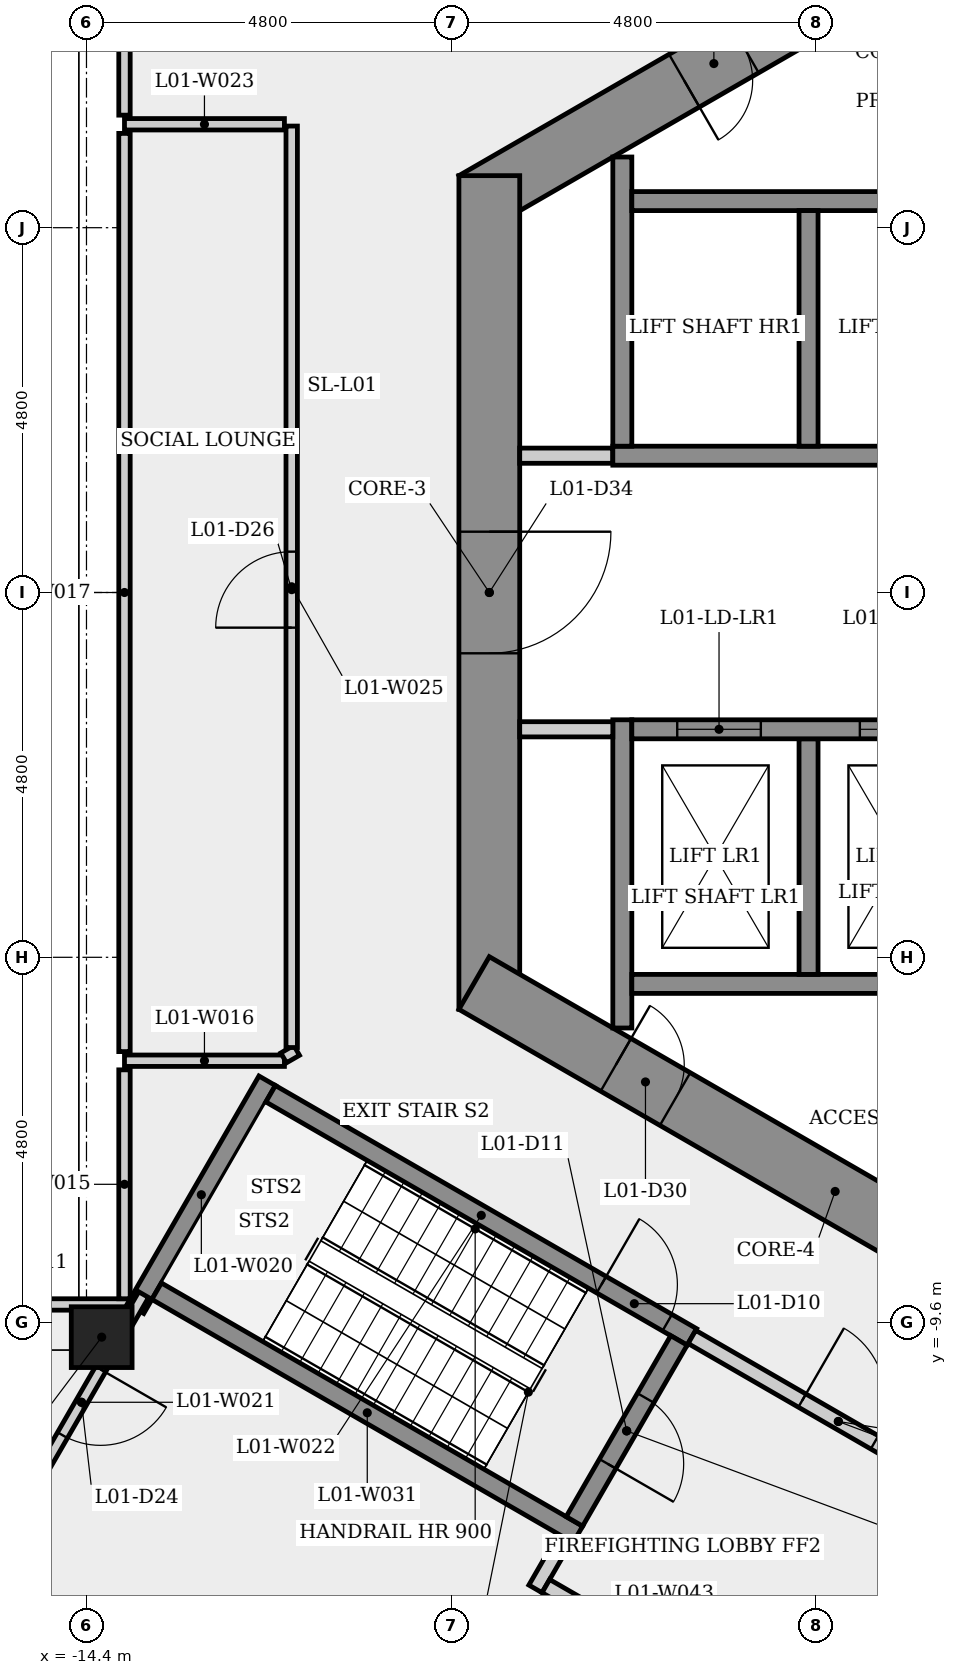
"""IFC4 building model, lengths in metres.
Left out: names, types, materials, properties, quantities, classifications, styles, units other than length and angle.
Written with IfcOpenShell. Run it as: python <this file> out.ifc"""

import sys

from ifc_helpers import new_model, si_unit, direction, frame, frame_2d, origin, origin_2d, place, context, subcontext, project, spatial, rectangle, extrude, element, fill, save


model = new_model("IFC4")
c1 = context("Model", 3, precision=1e-05, world=origin(), true_north=direction((0.0, 1.0)))
c2 = subcontext(c1, "Body", "Model", "MODEL_VIEW")
j1 = project(units=[si_unit("LENGTHUNIT", "METRE"), si_unit("PLANEANGLEUNIT", "RADIAN")], contexts=[c1])
p1 = place(None, origin())
s1 = spatial("IfcSite", under=j1, at=p1, CompositionType="ELEMENT")
p2 = place(p1, origin())
s2 = spatial("IfcBuilding", under=s1, at=p2, CompositionType="ELEMENT")
p3 = place(p2, frame((0.0, 0.0, 7.0)))
s3 = spatial("IfcBuildingStorey", under=s2, at=p3, CompositionType="ELEMENT", Elevation=7.0)
p4 = place(p3, frame((0.2, 10.623, 0.0), z_axis=(0.0, 0.0, 1.0), x_axis=(-0.866023993627, -0.500002442456, 0.0)))
e1 = element("IfcWall", 1, at=p4, inside=s3, PredefinedType="SHEAR", context=c2, shape_type="SweptSolid", body=[
    extrude(rectangle(XDim=10.97, YDim=0.8, at=frame_2d((5.485, 0.0))), origin(), (0.0, 0.0, 1.0), 4.5),
])
p5 = place(p4, frame((6.877, 0.0, 0.0)))
e2 = element("IfcOpeningElement", 2, at=p5, cuts=e1, PredefinedType="OPENING", context=c2, shape_type="SweptSolid", body=[
    extrude(rectangle(XDim=0.9, YDim=2.1, at=frame_2d((0.45, 1.05))), frame((0.0, 0.41, 0.0), z_axis=(0.0, -1.0, 0.0), x_axis=(1.0, 0.0, 0.0)), (0.0, 0.0, 1.0), 0.82),
])
p6 = place(p3, frame((-9.1, 5.485, 0.0), z_axis=(0.0, 0.0, 1.0), x_axis=(0.0, -1.0, 0.0)))
e3 = element("IfcWall", 3, at=p6, inside=s3, PredefinedType="SHEAR", context=c2, shape_type="SweptSolid", body=[
    extrude(rectangle(XDim=10.97, YDim=0.8, at=frame_2d((5.485, 0.0))), origin(), (0.0, 0.0, 1.0), 4.5),
])
p7 = place(p6, frame((4.685, 0.0, 0.0)))
e4 = element("IfcOpeningElement", 4, at=p7, cuts=e3, PredefinedType="OPENING", context=c2, shape_type="SweptSolid", body=[
    extrude(rectangle(XDim=1.6, YDim=2.1, at=frame_2d((0.8, 1.05))), frame((0.0, 0.41, 0.0), z_axis=(0.0, -1.0, 0.0), x_axis=(1.0, 0.0, 0.0)), (0.0, 0.0, 1.0), 0.82),
])
p8 = place(p3, frame((-9.3, -5.138, 0.0), z_axis=(0.0, 0.0, 1.0), x_axis=(0.866023993627, -0.500002442456, 0.0)))
e5 = element("IfcWall", 5, at=p8, inside=s3, PredefinedType="SHEAR", context=c2, shape_type="SweptSolid", body=[
    extrude(rectangle(XDim=10.97, YDim=0.8, at=frame_2d((5.485, 0.0))), origin(), (0.0, 0.0, 1.0), 4.5),
])
p9 = place(p8, frame((2.153, 0.0, 0.0)))
e6 = element("IfcOpeningElement", 6, at=p9, cuts=e5, PredefinedType="OPENING", context=c2, shape_type="SweptSolid", body=[
    extrude(rectangle(XDim=0.9, YDim=2.1, at=frame_2d((0.45, 1.05))), frame((0.0, 0.41, 0.0), z_axis=(0.0, -1.0, 0.0), x_axis=(1.0, 0.0, 0.0)), (0.0, 0.0, 1.0), 0.82),
])
p10 = place(p8, frame((8.787, 0.0, 0.0)))
e7 = element("IfcOpeningElement", 7, at=p10, cuts=e5, PredefinedType="OPENING", context=c2, shape_type="SweptSolid", body=[
    extrude(rectangle(XDim=0.9, YDim=2.1, at=frame_2d((0.45, 1.05))), frame((0.0, 0.41, 0.0), z_axis=(0.0, -1.0, 0.0), x_axis=(1.0, 0.0, 0.0)), (0.0, 0.0, 1.0), 0.82),
])
p11 = place(p3, frame((-14.2, -9.798, 0.0), z_axis=(0.0, 0.0, 1.0), x_axis=(-1.0, 0.0, 0.0)))
e8 = element("IfcColumn", 8, at=p11, inside=s3, PredefinedType="COLUMN", context=c2, shape_type="SweptSolid", body=[
    extrude(rectangle(XDim=0.8, YDim=0.8, at=origin_2d()), origin(), (0.0, 0.0, 1.0), 4.5),
])
p12 = place(p3, frame((-16.78, -9.368, 0.0), z_axis=(0.0, 0.0, 1.0), x_axis=(1.0, 0.0, 0.0)))
e9 = element("IfcWall", 9, at=p12, inside=s3, PredefinedType="PARTITIONING", context=c2, shape_type="SweptSolid", body=[
    extrude(rectangle(XDim=2.955, YDim=0.15, at=frame_2d((1.478, 0.0))), origin(), (0.0, 0.0, 1.0), 3.175),
])
p13 = place(p3, frame((-13.9, -9.293, 0.0), z_axis=(0.0, 0.0, 1.0), x_axis=(0.0, 1.0, 0.0)))
e10 = element("IfcWall", 10, at=p13, inside=s3, PredefinedType="PARTITIONING", context=c2, shape_type="SweptSolid", body=[
    extrude(rectangle(XDim=3.012, YDim=0.15, at=frame_2d((1.506, 0.0))), origin(), (0.0, 0.0, 1.0), 3.175),
])
p14 = place(p3, frame((-13.9, -6.161, 0.0), z_axis=(0.0, 0.0, 1.0), x_axis=(1.0, 0.0, 0.0)))
e11 = element("IfcWall", 11, at=p14, inside=s3, PredefinedType="PARTITIONING", context=c2, shape_type="SweptSolid", body=[
    extrude(rectangle(XDim=2.104, YDim=0.15, at=frame_2d((1.052, 0.0))), origin(), (0.0, 0.0, 1.0), 4.1),
])
p15 = place(p3, frame((-13.9, -6.041, 0.0), z_axis=(0.0, 0.0, 1.0), x_axis=(0.0, 1.0, 0.0)))
e12 = element("IfcWall", 12, at=p15, inside=s3, PredefinedType="PARTITIONING", context=c2, shape_type="SweptSolid", body=[
    extrude(rectangle(XDim=12.082, YDim=0.15, at=frame_2d((6.041, 0.0))), origin(), (0.0, 0.0, 1.0), 3.175),
])
p16 = place(p3, frame((-13.9, 6.281, 0.0), z_axis=(0.0, 0.0, 1.0), x_axis=(0.0, 1.0, 0.0)))
e13 = element("IfcWall", 13, at=p16, inside=s3, PredefinedType="PARTITIONING", context=c2, shape_type="SweptSolid", body=[
    extrude(rectangle(XDim=3.162, YDim=0.15, at=frame_2d((1.581, 0.0))), origin(), (0.0, 0.0, 1.0), 3.175),
])
p17 = place(p3, frame((-13.755, -9.424, 0.0), z_axis=(0.0, 0.0, 1.0), x_axis=(0.500005140434, 0.866022435933, 0.0)))
e14 = element("IfcWall", 14, at=p17, inside=s3, PredefinedType="SHEAR", context=c2, shape_type="SweptSolid", body=[
    extrude(rectangle(XDim=3.464, YDim=0.25, at=frame_2d((1.732, 0.0))), origin(), (0.0, 0.0, 1.0), 4.1),
])
p18 = place(p3, frame((-13.648, -9.239, 0.0), z_axis=(0.0, 0.0, 1.0), x_axis=(-0.50004125829, -0.866001581989, 0.0)))
e15 = element("IfcWall", 15, at=p18, inside=s3, PredefinedType="PARTITIONING", context=c2, shape_type="SweptSolid", body=[
    extrude(rectangle(XDim=3.27, YDim=0.15, at=frame_2d((1.635, 0.0))), origin(), (0.0, 0.0, 1.0), 4.1),
])
p19 = place(p18, frame((1.135, 0.0, 0.0)))
e16 = element("IfcOpeningElement", 16, at=p19, cuts=e15, PredefinedType="OPENING", context=c2, shape_type="SweptSolid", body=[
    extrude(rectangle(XDim=1.0, YDim=2.1, at=frame_2d((0.5, 1.05))), frame((0.0, 0.085, 0.0), z_axis=(0.0, -1.0, 0.0), x_axis=(1.0, 0.0, 0.0)), (0.0, 0.0, 1.0), 0.17),
])
p20 = place(p3, frame((-11.977, -6.595, 0.0), z_axis=(0.0, 0.0, 1.0), x_axis=(0.866025499775, -0.499999833739, 0.0)))
e17 = element("IfcWall", 17, at=p20, inside=s3, PredefinedType="SHEAR", context=c2, shape_type="SweptSolid", body=[
    extrude(rectangle(XDim=6.4, YDim=0.25, at=frame_2d((3.2, 0.0))), origin(), (0.0, 0.0, 1.0), 4.1),
])
p21 = place(p20, frame((5.025, 0.0, 0.0)))
e18 = element("IfcOpeningElement", 18, at=p21, cuts=e17, PredefinedType="OPENING", context=c2, shape_type="SweptSolid", body=[
    extrude(rectangle(XDim=1.0, YDim=2.1, at=frame_2d((0.5, 1.05))), frame((0.0, 0.135, 0.0), z_axis=(0.0, -1.0, 0.0), x_axis=(1.0, 0.0, 0.0)), (0.0, 0.0, 1.0), 0.27),
])
p22 = place(p3, frame((-11.796, 6.161, 0.0), z_axis=(0.0, 0.0, 1.0), x_axis=(-1.0, 0.0, 0.0)))
e19 = element("IfcWall", 19, at=p22, inside=s3, PredefinedType="PARTITIONING", context=c2, shape_type="SweptSolid", body=[
    extrude(rectangle(XDim=2.104, YDim=0.15, at=frame_2d((1.052, 0.0))), origin(), (0.0, 0.0, 1.0), 4.1),
])
p23 = place(p3, frame((-11.806, -6.123, 0.0), z_axis=(0.0, 0.0, 1.0), x_axis=(0.866103179807, 0.499865263774, 0.0)))
e20 = element("IfcWall", 20, at=p23, inside=s3, PredefinedType="PARTITIONING", context=c2, shape_type="SweptSolid", body=[
    extrude(rectangle(XDim=0.197, YDim=0.15, at=frame_2d((0.099, 0.0))), origin(), (0.0, 0.0, 1.0), 4.1),
])
p24 = place(p3, frame((-11.7, -5.987, 0.0), z_axis=(0.0, 0.0, 1.0), x_axis=(0.0, 1.0, 0.0)))
e21 = element("IfcWall", 21, at=p24, inside=s3, PredefinedType="PARTITIONING", context=c2, shape_type="SweptSolid", body=[
    extrude(rectangle(XDim=12.125, YDim=0.15, at=frame_2d((6.062, 0.0))), origin(), (0.0, 0.0, 1.0), 4.1),
])
p25 = place(p24, frame((5.525, 0.0, 0.0)))
e22 = element("IfcOpeningElement", 22, at=p25, cuts=e21, PredefinedType="OPENING", context=c2, shape_type="SweptSolid", body=[
    extrude(rectangle(XDim=1.0, YDim=2.1, at=frame_2d((0.5, 1.05))), frame((0.0, 0.085, 0.0), z_axis=(0.0, -1.0, 0.0), x_axis=(1.0, 0.0, 0.0)), (0.0, 0.0, 1.0), 0.17),
])
p26 = place(p3, frame((-8.7, 1.8, 0.0), z_axis=(0.0, 0.0, 1.0), x_axis=(1.0, 0.0, 0.0)))
e23 = element("IfcWall", 23, at=p26, inside=s3, PredefinedType="PARTITIONING", context=c2, shape_type="SweptSolid", body=[
    extrude(rectangle(XDim=1.225, YDim=0.2, at=frame_2d((0.613, 0.0))), origin(), (0.0, 0.0, 1.0), 4.1),
])
p27 = place(p3, frame((-8.493, -13.11, 0.0), z_axis=(0.0, 0.0, 1.0), x_axis=(0.500067724834, 0.865986299303, 0.0)))
e24 = element("IfcWall", 24, at=p27, inside=s3, PredefinedType="PARTITIONING", context=c2, shape_type="SweptSolid", body=[
    extrude(rectangle(XDim=0.775, YDim=0.2, at=frame_2d((0.388, 0.0))), origin(), (0.0, 0.0, 1.0), 4.1),
])
p28 = place(p3, frame((-7.935, -12.393, 0.0), z_axis=(0.0, 0.0, 1.0), x_axis=(-0.866025499775, 0.499999833739, 0.0)))
e25 = element("IfcWall", 25, at=p28, inside=s3, PredefinedType="SHEAR", context=c2, shape_type="SweptSolid", body=[
    extrude(rectangle(XDim=6.4, YDim=0.25, at=frame_2d((3.2, 0.0))), origin(), (0.0, 0.0, 1.0), 4.1),
])
p29 = place(p3, frame((-7.836, -13.373, 0.0), z_axis=(0.0, 0.0, 1.0), x_axis=(-0.866232998003, 0.499640263761, 0.0)))
e26 = element("IfcWall", 26, at=p29, inside=s3, PredefinedType="PARTITIONING", context=c2, shape_type="SweptSolid", body=[
    extrude(rectangle(XDim=0.6, YDim=0.2, at=frame_2d((0.3, 0.0))), origin(), (0.0, 0.0, 1.0), 4.1),
])
p30 = place(p3, frame((-7.475, 1.8, 0.0), z_axis=(0.0, 0.0, 1.0), x_axis=(1.0, 0.0, 0.0)))
e27 = element("IfcWall", 27, at=p30, inside=s3, PredefinedType="SHEAR", context=c2, shape_type="SweptSolid", body=[
    extrude(rectangle(XDim=14.95, YDim=0.25, at=frame_2d((7.475, 0.0))), origin(), (0.0, 0.0, 1.0), 4.1),
])
p31 = place(p3, frame((-7.35, -5.73, 0.0), z_axis=(0.0, 0.0, 1.0), x_axis=(0.0, 1.0, 0.0)))
e28 = element("IfcWall", 28, at=p31, inside=s3, PredefinedType="SHEAR", context=c2, shape_type="SweptSolid", body=[
    extrude(rectangle(XDim=4.055, YDim=0.25, at=frame_2d((2.028, 0.0))), origin(), (0.0, 0.0, 1.0), 4.1),
])
p32 = place(p3, frame((-7.35, 1.925, 0.0), z_axis=(0.0, 0.0, 1.0), x_axis=(0.0, 1.0, 0.0)))
e29 = element("IfcWall", 29, at=p32, inside=s3, PredefinedType="SHEAR", context=c2, shape_type="SweptSolid", body=[
    extrude(rectangle(XDim=3.805, YDim=0.25, at=frame_2d((1.903, 0.0))), origin(), (0.0, 0.0, 1.0), 4.1),
])
p33 = place(p3, frame((-7.225, 5.15, 0.0), z_axis=(0.0, 0.0, 1.0), x_axis=(1.0, 0.0, 0.0)))
e30 = element("IfcWall", 30, at=p33, inside=s3, PredefinedType="SHEAR", context=c2, shape_type="SweptSolid", body=[
    extrude(rectangle(XDim=14.7, YDim=0.25, at=frame_2d((7.35, 0.0))), origin(), (0.0, 0.0, 1.0), 4.1),
])
p34 = place(p3, frame((-7.475, -1.8, 0.0), z_axis=(0.0, 0.0, 1.0), x_axis=(-1.0, 0.0, 0.0)))
e31 = element("IfcWall", 31, at=p34, inside=s3, PredefinedType="PARTITIONING", context=c2, shape_type="SweptSolid", body=[
    extrude(rectangle(XDim=1.225, YDim=0.2, at=frame_2d((0.613, 0.0))), origin(), (0.0, 0.0, 1.0), 4.1),
])
p35 = place(p3, frame((-6.605, -9.841, 0.0), z_axis=(0.0, 0.0, 1.0), x_axis=(-0.499996545922, -0.866027397988, 0.0)))
e32 = element("IfcWall", 32, at=p35, inside=s3, PredefinedType="SHEAR", context=c2, shape_type="SweptSolid", body=[
    extrude(rectangle(XDim=2.75, YDim=0.25, at=frame_2d((1.375, 0.0))), origin(), (0.0, 0.0, 1.0), 4.1),
])
p36 = place(p35, frame((0.875, 0.0, 0.0)))
e33 = element("IfcOpeningElement", 33, at=p36, cuts=e32, PredefinedType="OPENING", context=c2, shape_type="SweptSolid", body=[
    extrude(rectangle(XDim=1.0, YDim=2.1, at=frame_2d((0.5, 1.05))), frame((0.0, 0.135, 0.0), z_axis=(0.0, -1.0, 0.0), x_axis=(1.0, 0.0, 0.0)), (0.0, 0.0, 1.0), 0.27),
])
p37 = place(p3, frame((-6.435, -9.795, 0.0), z_axis=(0.0, 0.0, 1.0), x_axis=(0.866012907634, -0.500021643343, 0.0)))
e34 = element("IfcWall", 34, at=p37, inside=s3, PredefinedType="PARTITIONING", context=c2, shape_type="SweptSolid", body=[
    extrude(rectangle(XDim=4.45, YDim=0.2, at=frame_2d((2.225, 0.0))), origin(), (0.0, 0.0, 1.0), 4.1),
])
p38 = place(p37, frame((1.675, 0.0, 0.0)))
e35 = element("IfcOpeningElement", 35, at=p38, cuts=e34, PredefinedType="OPENING", context=c2, shape_type="SweptSolid", body=[
    extrude(rectangle(XDim=1.1, YDim=2.1, at=frame_2d((0.55, 1.05))), frame((0.0, 0.11, 0.0), z_axis=(0.0, -1.0, 0.0), x_axis=(1.0, 0.0, 0.0)), (0.0, 0.0, 1.0), 0.22),
])
p39 = place(p3, frame((-7.225, -5.15, 0.0), z_axis=(0.0, 0.0, 1.0), x_axis=(1.0, 0.0, 0.0)))
e36 = element("IfcWall", 36, at=p39, inside=s3, PredefinedType="SHEAR", context=c2, shape_type="SweptSolid", body=[
    extrude(rectangle(XDim=14.7, YDim=0.25, at=frame_2d((7.35, 0.0))), origin(), (0.0, 0.0, 1.0), 4.1),
])
for number, where, z_axis, x_axis in (
    (37, (-4.9, -1.925, 0.0), (0.0, 0.0, 1.0), (0.0, -1.0, 0.0)),
    (38, (-4.9, 5.025, 0.0), (0.0, 0.0, 1.0), (0.0, -1.0, 0.0)),
):
    element("IfcWall", number, at=place(p3, frame(where, z_axis=z_axis, x_axis=x_axis)), inside=s3, PredefinedType="SHEAR", context=c2, shape_type="SweptSolid", body=[
        extrude(rectangle(XDim=3.1, YDim=0.25, at=frame_2d((1.55, 0.0))), origin(), (0.0, 0.0, 1.0), 4.5),
    ])
p40 = place(p3, frame((-7.225, -1.8, 0.0), z_axis=(0.0, 0.0, 1.0), x_axis=(1.0, 0.0, 0.0)))
e39 = element("IfcWall", 39, at=p40, inside=s3, PredefinedType="SHEAR", context=c2, shape_type="SweptSolid", body=[
    extrude(rectangle(XDim=14.7, YDim=0.25, at=frame_2d((7.35, 0.0))), origin(), (0.0, 0.0, 1.0), 4.1),
])
p41 = place(p40, frame((0.597, 0.0, 0.0)))
e40 = element("IfcOpeningElement", 40, at=p41, cuts=e39, PredefinedType="OPENING", context=c2, shape_type="SweptSolid", body=[
    extrude(rectangle(XDim=1.1, YDim=2.1, at=frame_2d((0.55, 1.05))), frame((0.0, 0.135, 0.0), z_axis=(0.0, -1.0, 0.0), x_axis=(1.0, 0.0, 0.0)), (0.0, 0.0, 1.0), 0.27),
])
p42 = place(p40, frame((3.0, 0.0, 0.0)))
e41 = element("IfcOpeningElement", 41, at=p42, cuts=e39, PredefinedType="OPENING", context=c2, shape_type="SweptSolid", body=[
    extrude(rectangle(XDim=1.1, YDim=2.1, at=frame_2d((0.55, 1.05))), frame((0.0, 0.135, 0.0), z_axis=(0.0, -1.0, 0.0), x_axis=(1.0, 0.0, 0.0)), (0.0, 0.0, 1.0), 0.27),
])
p43 = place(p40, frame((5.45, 0.0, 0.0)))
e42 = element("IfcOpeningElement", 42, at=p43, cuts=e39, PredefinedType="OPENING", context=c2, shape_type="SweptSolid", body=[
    extrude(rectangle(XDim=1.1, YDim=2.1, at=frame_2d((0.55, 1.05))), frame((0.0, 0.135, 0.0), z_axis=(0.0, -1.0, 0.0), x_axis=(1.0, 0.0, 0.0)), (0.0, 0.0, 1.0), 0.27),
])
p44 = place(p40, frame((7.9, 0.0, 0.0)))
e43 = element("IfcOpeningElement", 43, at=p44, cuts=e39, PredefinedType="OPENING", context=c2, shape_type="SweptSolid", body=[
    extrude(rectangle(XDim=1.1, YDim=2.1, at=frame_2d((0.55, 1.05))), frame((0.0, 0.135, 0.0), z_axis=(0.0, -1.0, 0.0), x_axis=(1.0, 0.0, 0.0)), (0.0, 0.0, 1.0), 0.27),
])
p45 = place(p40, frame((10.35, 0.0, 0.0)))
e44 = element("IfcOpeningElement", 44, at=p45, cuts=e39, PredefinedType="OPENING", context=c2, shape_type="SweptSolid", body=[
    extrude(rectangle(XDim=1.1, YDim=2.1, at=frame_2d((0.55, 1.05))), frame((0.0, 0.135, 0.0), z_axis=(0.0, -1.0, 0.0), x_axis=(1.0, 0.0, 0.0)), (0.0, 0.0, 1.0), 0.27),
])
p46 = place(p41, origin())
e45 = element("IfcDoor", 45, at=p46, inside=s3, OperationType="SLIDING_TO_LEFT", PredefinedType="DOOR", context=c2, shape_type="SweptSolid", body=[
    extrude(rectangle(XDim=1.1, YDim=2.1, at=frame_2d((0.55, 1.05))), frame((0.0, 0.025, 0.0), z_axis=(0.0, -1.0, 0.0), x_axis=(1.0, 0.0, 0.0)), (0.0, 0.0, 1.0), 0.05),
])
fill(e40, e45)
p47 = place(p42, origin())
e46 = element("IfcDoor", 46, at=p47, inside=s3, OperationType="SLIDING_TO_LEFT", PredefinedType="DOOR", context=c2, shape_type="SweptSolid", body=[
    extrude(rectangle(XDim=1.1, YDim=2.1, at=frame_2d((0.55, 1.05))), frame((0.0, 0.025, 0.0), z_axis=(0.0, -1.0, 0.0), x_axis=(1.0, 0.0, 0.0)), (0.0, 0.0, 1.0), 0.05),
])
fill(e41, e46)
p48 = place(p21, origin())
e47 = element("IfcDoor", 47, at=p48, inside=s3, OperationType="SINGLE_SWING_LEFT", PredefinedType="DOOR", context=c2, shape_type="SweptSolid", body=[
    extrude(rectangle(XDim=1.0, YDim=2.1, at=frame_2d((0.5, 1.05))), frame((0.0, 0.025, 0.0), z_axis=(0.0, -1.0, 0.0), x_axis=(1.0, 0.0, 0.0)), (0.0, 0.0, 1.0), 0.05),
])
fill(e18, e47)
p49 = place(p36, origin())
e48 = element("IfcDoor", 48, at=p49, inside=s3, OperationType="SINGLE_SWING_RIGHT", PredefinedType="DOOR", context=c2, shape_type="SweptSolid", body=[
    extrude(rectangle(XDim=1.0, YDim=2.1, at=frame_2d((0.5, 1.05))), frame((0.0, 0.025, 0.0), z_axis=(0.0, -1.0, 0.0), x_axis=(1.0, 0.0, 0.0)), (0.0, 0.0, 1.0), 0.05),
])
fill(e33, e48)
p50 = place(p38, origin())
e49 = element("IfcDoor", 49, at=p50, inside=s3, OperationType="SINGLE_SWING_LEFT", PredefinedType="DOOR", context=c2, shape_type="SweptSolid", body=[
    extrude(rectangle(XDim=1.1, YDim=2.1, at=frame_2d((0.55, 1.05))), frame((0.0, 0.025, 0.0), z_axis=(0.0, -1.0, 0.0), x_axis=(1.0, 0.0, 0.0)), (0.0, 0.0, 1.0), 0.05),
])
fill(e35, e49)
p51 = place(p19, origin())
e50 = element("IfcDoor", 50, at=p51, inside=s3, OperationType="SINGLE_SWING_LEFT", PredefinedType="DOOR", context=c2, shape_type="SweptSolid", body=[
    extrude(rectangle(XDim=1.0, YDim=2.1, at=frame_2d((0.5, 1.05))), frame((0.0, 0.025, 0.0), z_axis=(0.0, -1.0, 0.0), x_axis=(1.0, 0.0, 0.0)), (0.0, 0.0, 1.0), 0.05),
])
fill(e16, e50)
p52 = place(p25, origin())
e51 = element("IfcDoor", 51, at=p52, inside=s3, OperationType="SINGLE_SWING_LEFT", PredefinedType="DOOR", context=c2, shape_type="SweptSolid", body=[
    extrude(rectangle(XDim=1.0, YDim=2.1, at=frame_2d((0.5, 1.05))), frame((0.0, 0.025, 0.0), z_axis=(0.0, -1.0, 0.0), x_axis=(1.0, 0.0, 0.0)), (0.0, 0.0, 1.0), 0.05),
])
fill(e22, e51)
p53 = place(p5, origin())
e52 = element("IfcDoor", 52, at=p53, inside=s3, OperationType="SINGLE_SWING_RIGHT", PredefinedType="DOOR", context=c2, shape_type="SweptSolid", body=[
    extrude(rectangle(XDim=0.9, YDim=2.1, at=frame_2d((0.45, 1.05))), frame((0.0, 0.025, 0.0), z_axis=(0.0, -1.0, 0.0), x_axis=(1.0, 0.0, 0.0)), (0.0, 0.0, 1.0), 0.05),
])
fill(e2, e52)
p54 = place(p9, origin())
e53 = element("IfcDoor", 53, at=p54, inside=s3, OperationType="SINGLE_SWING_LEFT", PredefinedType="DOOR", context=c2, shape_type="SweptSolid", body=[
    extrude(rectangle(XDim=0.9, YDim=2.1, at=frame_2d((0.45, 1.05))), frame((0.0, 0.025, 0.0), z_axis=(0.0, -1.0, 0.0), x_axis=(1.0, 0.0, 0.0)), (0.0, 0.0, 1.0), 0.05),
])
fill(e6, e53)
p55 = place(p7, origin())
e54 = element("IfcDoor", 54, at=p55, inside=s3, OperationType="SINGLE_SWING_LEFT", PredefinedType="DOOR", context=c2, shape_type="SweptSolid", body=[
    extrude(rectangle(XDim=1.6, YDim=2.1, at=frame_2d((0.8, 1.05))), frame((0.0, 0.025, 0.0), z_axis=(0.0, -1.0, 0.0), x_axis=(1.0, 0.0, 0.0)), (0.0, 0.0, 1.0), 0.05),
])
fill(e4, e54)
save(model, sys.argv[1])
